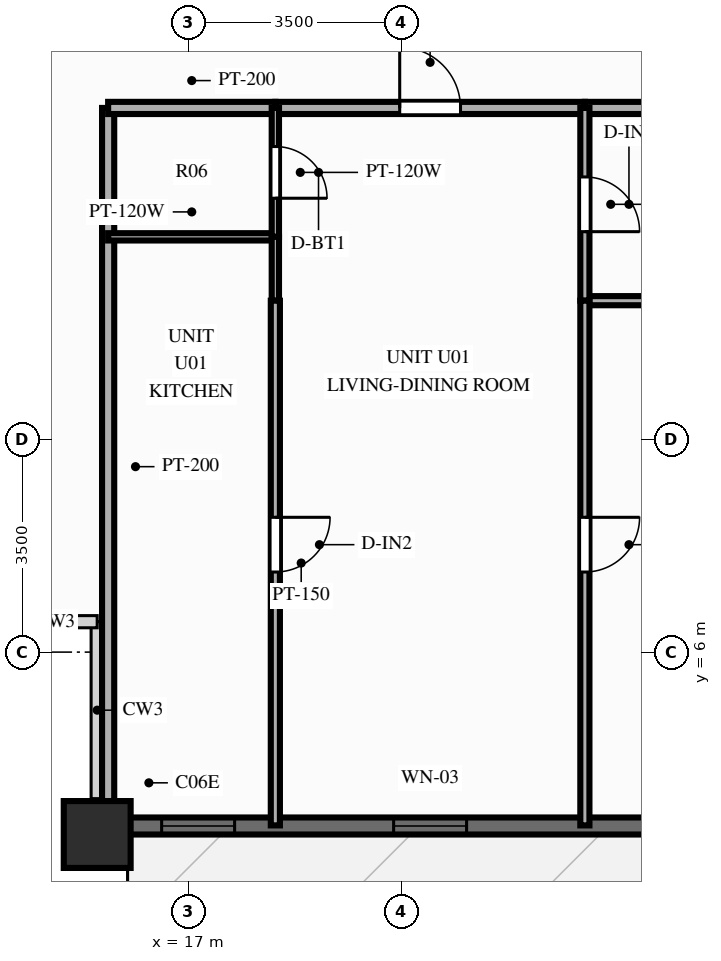
"""IFC4 building model, lengths in metres.
Left out: names, types, materials, properties, quantities, classifications, styles, units other than length and angle.
Written with IfcOpenShell. Run it as: python <this file> out.ifc"""

import sys

from ifc_helpers import new_model, si_unit, direction, frame, frame_2d, origin, origin_2d, place, context, subcontext, project, spatial, rectangle, extrude, source, transform, mapped, element, fill, save


model = new_model("IFC4")
c1 = context("Model", 3, precision=1e-05, world=origin(), true_north=direction((0.0, 1.0)))
c2 = subcontext(c1, "Body", "Model", "MODEL_VIEW")
j1 = project(units=[si_unit("LENGTHUNIT", "METRE"), si_unit("PLANEANGLEUNIT", "RADIAN")], contexts=[c1])
p1 = place(None, origin())
s1 = spatial("IfcSite", under=j1, at=p1, CompositionType="ELEMENT")
p2 = place(p1, origin())
s2 = spatial("IfcBuilding", under=s1, at=p2, CompositionType="ELEMENT")
p3 = place(p2, frame((0.0, 0.0, 34.4)))
s3 = spatial("IfcBuildingStorey", under=s2, at=p3, CompositionType="ELEMENT", Elevation=34.4)
m1 = source(origin(), c2, "Body", "SweptSolid", [
    extrude(rectangle(XDim=1.1, YDim=1.1, at=origin_2d()), origin(), (0.0, 0.0, 1.0), 3.0),
])
p4 = place(p3, frame((15.5, 3.0, 0.0), z_axis=(0.0, 0.0, 1.0), x_axis=(1.0, 0.0, 0.0)))
e1 = element("IfcColumn", 1, at=p4, inside=s3, PredefinedType="COLUMN", context=c2, shape_type="MappedRepresentation", body=[
    mapped(m1, transform((0.0, 0.0, 0.0), scale=1.0)),
])
p5 = place(p3, frame((15.5, 3.14, 0.0), z_axis=(0.0, 0.0, 1.0), x_axis=(1.0, 0.0, 0.0)))
e2 = element("IfcWall", 2, at=p5, inside=s3, PredefinedType="SOLIDWALL", context=c2, shape_type="SweptSolid", body=[
    extrude(rectangle(XDim=45.0, YDim=0.28, at=frame_2d((22.5, 0.0))), origin(), (0.0, 0.0, 1.0), 2.28),
])
p6 = place(p5, frame((1.06, 0.0, 0.25)))
e3 = element("IfcOpeningElement", 3, at=p6, cuts=e2, PredefinedType="OPENING", context=c2, shape_type="SweptSolid", body=[
    extrude(rectangle(XDim=1.2, YDim=1.5, at=frame_2d((0.6, 0.75))), frame((0.0, 0.152, 0.0), z_axis=(0.0, -1.0, 0.0), x_axis=(1.0, 0.0, 0.0)), (0.0, 0.0, 1.0), 0.304),
])
p7 = place(p5, frame((4.875, 0.0, 0.25)))
e4 = element("IfcOpeningElement", 4, at=p7, cuts=e2, PredefinedType="OPENING", context=c2, shape_type="SweptSolid", body=[
    extrude(rectangle(XDim=1.2, YDim=1.5, at=frame_2d((0.6, 0.75))), frame((0.0, 0.152, 0.0), z_axis=(0.0, -1.0, 0.0), x_axis=(1.0, 0.0, 0.0)), (0.0, 0.0, 1.0), 0.304),
])
p8 = place(p5, frame((9.303, 0.0, 0.25)))
e5 = element("IfcOpeningElement", 5, at=p8, cuts=e2, PredefinedType="OPENING", context=c2, shape_type="SweptSolid", body=[
    extrude(rectangle(XDim=1.2, YDim=1.5, at=frame_2d((0.6, 0.75))), frame((0.0, 0.152, 0.0), z_axis=(0.0, -1.0, 0.0), x_axis=(1.0, 0.0, 0.0)), (0.0, 0.0, 1.0), 0.304),
])
p9 = place(p5, frame((13.098, 0.0, 0.25)))
e6 = element("IfcOpeningElement", 6, at=p9, cuts=e2, PredefinedType="OPENING", context=c2, shape_type="SweptSolid", body=[
    extrude(rectangle(XDim=1.2, YDim=1.5, at=frame_2d((0.6, 0.75))), frame((0.0, 0.152, 0.0), z_axis=(0.0, -1.0, 0.0), x_axis=(1.0, 0.0, 0.0)), (0.0, 0.0, 1.0), 0.304),
])
p10 = place(p5, frame((17.408, 0.0, 0.25)))
e7 = element("IfcOpeningElement", 7, at=p10, cuts=e2, PredefinedType="OPENING", context=c2, shape_type="SweptSolid", body=[
    extrude(rectangle(XDim=1.2, YDim=1.5, at=frame_2d((0.6, 0.75))), frame((0.0, 0.152, 0.0), z_axis=(0.0, -1.0, 0.0), x_axis=(1.0, 0.0, 0.0)), (0.0, 0.0, 1.0), 0.304),
])
p11 = place(p5, frame((22.06, 0.0, 0.0), z_axis=(0.0, 0.0, 1.0), x_axis=(-1.0, 0.0, 0.0)))
e8 = element("IfcOpeningElement", 8, at=p11, cuts=e2, PredefinedType="OPENING", context=c2, shape_type="SweptSolid", body=[
    extrude(rectangle(XDim=1.1, YDim=2.15, at=frame_2d((0.55, 1.075))), frame((0.0, 0.152, 0.0), z_axis=(0.0, -1.0, 0.0), x_axis=(1.0, 0.0, 0.0)), (0.0, 0.0, 1.0), 0.304),
])
p12 = place(p5, frame((24.168, 0.0, 0.25)))
e9 = element("IfcOpeningElement", 9, at=p12, cuts=e2, PredefinedType="OPENING", context=c2, shape_type="SweptSolid", body=[
    extrude(rectangle(XDim=1.2, YDim=1.5, at=frame_2d((0.6, 0.75))), frame((0.0, 0.152, 0.0), z_axis=(0.0, -1.0, 0.0), x_axis=(1.0, 0.0, 0.0)), (0.0, 0.0, 1.0), 0.304),
])
p13 = place(p5, frame((26.776, 0.0, 0.25)))
e10 = element("IfcOpeningElement", 10, at=p13, cuts=e2, PredefinedType="OPENING", context=c2, shape_type="SweptSolid", body=[
    extrude(rectangle(XDim=1.2, YDim=1.5, at=frame_2d((0.6, 0.75))), frame((0.0, 0.152, 0.0), z_axis=(0.0, -1.0, 0.0), x_axis=(1.0, 0.0, 0.0)), (0.0, 0.0, 1.0), 0.304),
])
p14 = place(p5, frame((31.613, 0.0, 0.25)))
e11 = element("IfcOpeningElement", 11, at=p14, cuts=e2, PredefinedType="OPENING", context=c2, shape_type="SweptSolid", body=[
    extrude(rectangle(XDim=1.2, YDim=1.5, at=frame_2d((0.6, 0.75))), frame((0.0, 0.152, 0.0), z_axis=(0.0, -1.0, 0.0), x_axis=(1.0, 0.0, 0.0)), (0.0, 0.0, 1.0), 0.304),
])
p15 = place(p5, frame((34.881, 0.0, 0.25)))
e12 = element("IfcOpeningElement", 12, at=p15, cuts=e2, PredefinedType="OPENING", context=c2, shape_type="SweptSolid", body=[
    extrude(rectangle(XDim=1.2, YDim=1.5, at=frame_2d((0.6, 0.75))), frame((0.0, 0.152, 0.0), z_axis=(0.0, -1.0, 0.0), x_axis=(1.0, 0.0, 0.0)), (0.0, 0.0, 1.0), 0.304),
])
p16 = place(p5, frame((38.355, 0.0, 0.25)))
e13 = element("IfcOpeningElement", 13, at=p16, cuts=e2, PredefinedType="OPENING", context=c2, shape_type="SweptSolid", body=[
    extrude(rectangle(XDim=1.2, YDim=1.5, at=frame_2d((0.6, 0.75))), frame((0.0, 0.152, 0.0), z_axis=(0.0, -1.0, 0.0), x_axis=(1.0, 0.0, 0.0)), (0.0, 0.0, 1.0), 0.304),
])
p17 = place(p5, frame((42.232, 0.0, 0.25)))
e14 = element("IfcOpeningElement", 14, at=p17, cuts=e2, PredefinedType="OPENING", context=c2, shape_type="SweptSolid", body=[
    extrude(rectangle(XDim=1.2, YDim=1.5, at=frame_2d((0.6, 0.75))), frame((0.0, 0.152, 0.0), z_axis=(0.0, -1.0, 0.0), x_axis=(1.0, 0.0, 0.0)), (0.0, 0.0, 1.0), 0.304),
])
p18 = place(p3, frame((15.68, 14.95, 0.0), z_axis=(0.0, 0.0, 1.0), x_axis=(0.0, -1.0, 0.0)))
e15 = element("IfcWall", 15, at=p18, inside=s3, PredefinedType="PARTITIONING", context=c2, shape_type="SweptSolid", body=[
    extrude(rectangle(XDim=11.8, YDim=0.2, at=frame_2d((5.9, 0.0))), origin(), (0.0, 0.0, 1.0), 2.79),
])
p19 = place(p3, frame((15.68, 14.95, 0.0), z_axis=(0.0, 0.0, 1.0), x_axis=(1.0, 0.0, 0.0)))
e16 = element("IfcWall", 16, at=p19, inside=s3, PredefinedType="PARTITIONING", context=c2, shape_type="SweptSolid", body=[
    extrude(rectangle(XDim=2.75, YDim=0.2, at=frame_2d((1.375, 0.0))), origin(), (0.0, 0.0, 1.0), 2.79),
])
p20 = place(p3, frame((18.43, 14.95, 0.0), z_axis=(0.0, 0.0, 1.0), x_axis=(1.0, 0.0, 0.0)))
e17 = element("IfcWall", 17, at=p20, inside=s3, PredefinedType="PARTITIONING", context=c2, shape_type="SweptSolid", body=[
    extrude(rectangle(XDim=5.091, YDim=0.2, at=frame_2d((2.545, 0.0))), origin(), (0.0, 0.0, 1.0), 2.79),
])
p21 = place(p20, frame((2.045, 0.0, 0.0)))
e18 = element("IfcOpeningElement", 18, at=p21, cuts=e17, PredefinedType="OPENING", context=c2, shape_type="SweptSolid", body=[
    extrude(rectangle(XDim=1.0, YDim=2.15, at=frame_2d((0.5, 1.075))), frame((0.0, 0.112, 0.0), z_axis=(0.0, -1.0, 0.0), x_axis=(1.0, 0.0, 0.0)), (0.0, 0.0, 1.0), 0.224),
])
p22 = place(p3, frame((23.521, 14.95, 0.0), z_axis=(0.0, 0.0, 1.0), x_axis=(1.0, 0.0, 0.0)))
e19 = element("IfcWall", 19, at=p22, inside=s3, PredefinedType="PARTITIONING", context=c2, shape_type="SweptSolid", body=[
    extrude(rectangle(XDim=3.766, YDim=0.2, at=frame_2d((1.883, 0.0))), origin(), (0.0, 0.0, 1.0), 2.79),
])
p23 = place(p3, frame((15.68, 12.83, 0.0), z_axis=(0.0, 0.0, 1.0), x_axis=(1.0, 0.0, 0.0)))
e20 = element("IfcWall", 20, at=p23, inside=s3, PredefinedType="PARTITIONING", context=c2, shape_type="SweptSolid", body=[
    extrude(rectangle(XDim=2.75, YDim=0.12, at=frame_2d((1.375, 0.0))), origin(), (0.0, 0.0, 1.0), 2.79),
])
p24 = place(p3, frame((23.521, 11.78, 0.0), z_axis=(0.0, 0.0, 1.0), x_axis=(1.0, 0.0, 0.0)))
e21 = element("IfcWall", 21, at=p24, inside=s3, PredefinedType="PARTITIONING", context=c2, shape_type="SweptSolid", body=[
    extrude(rectangle(XDim=3.766, YDim=0.15, at=frame_2d((1.883, 0.0))), origin(), (0.0, 0.0, 1.0), 2.79),
])
p25 = place(p3, frame((18.43, 14.95, 0.0), z_axis=(0.0, 0.0, 1.0), x_axis=(0.0, -1.0, 0.0)))
e22 = element("IfcWall", 22, at=p25, inside=s3, PredefinedType="PARTITIONING", context=c2, shape_type="SweptSolid", body=[
    extrude(rectangle(XDim=2.12, YDim=0.12, at=frame_2d((1.06, 0.0))), origin(), (0.0, 0.0, 1.0), 2.79),
])
p26 = place(p25, frame((0.635, 0.0, 0.0)))
e23 = element("IfcOpeningElement", 23, at=p26, cuts=e22, PredefinedType="OPENING", context=c2, shape_type="SweptSolid", body=[
    extrude(rectangle(XDim=0.85, YDim=2.05, at=frame_2d((0.425, 1.025))), frame((0.0, 0.072, 0.0), z_axis=(0.0, -1.0, 0.0), x_axis=(1.0, 0.0, 0.0)), (0.0, 0.0, 1.0), 0.144),
])
p27 = place(p3, frame((18.43, 12.83, 0.0), z_axis=(0.0, 0.0, 1.0), x_axis=(0.0, -1.0, 0.0)))
e24 = element("IfcWall", 24, at=p27, inside=s3, PredefinedType="PARTITIONING", context=c2, shape_type="SweptSolid", body=[
    extrude(rectangle(XDim=1.05, YDim=0.12, at=frame_2d((0.525, 0.0))), origin(), (0.0, 0.0, 1.0), 2.79),
])
p28 = place(p3, frame((18.43, 11.78, 0.0), z_axis=(0.0, 0.0, 1.0), x_axis=(0.0, -1.0, 0.0)))
e25 = element("IfcWall", 25, at=p28, inside=s3, PredefinedType="PARTITIONING", context=c2, shape_type="SweptSolid", body=[
    extrude(rectangle(XDim=8.63, YDim=0.15, at=frame_2d((4.315, 0.0))), origin(), (0.0, 0.0, 1.0), 2.79),
])
p29 = place(p28, frame((3.563, 0.0, 0.0)))
e26 = element("IfcOpeningElement", 26, at=p29, cuts=e25, PredefinedType="OPENING", context=c2, shape_type="SweptSolid", body=[
    extrude(rectangle(XDim=0.9, YDim=2.1, at=frame_2d((0.45, 1.05))), frame((0.0, 0.087, 0.0), z_axis=(0.0, -1.0, 0.0), x_axis=(1.0, 0.0, 0.0)), (0.0, 0.0, 1.0), 0.174),
])
p30 = place(p3, frame((23.521, 14.95, 0.0), z_axis=(0.0, 0.0, 1.0), x_axis=(0.0, -1.0, 0.0)))
e27 = element("IfcWall", 27, at=p30, inside=s3, PredefinedType="PARTITIONING", context=c2, shape_type="SweptSolid", body=[
    extrude(rectangle(XDim=3.17, YDim=0.15, at=frame_2d((1.585, 0.0))), origin(), (0.0, 0.0, 1.0), 2.79),
])
p31 = place(p30, frame((1.135, 0.0, 0.0)))
e28 = element("IfcOpeningElement", 28, at=p31, cuts=e27, PredefinedType="OPENING", context=c2, shape_type="SweptSolid", body=[
    extrude(rectangle(XDim=0.9, YDim=2.1, at=frame_2d((0.45, 1.05))), frame((0.0, 0.087, 0.0), z_axis=(0.0, -1.0, 0.0), x_axis=(1.0, 0.0, 0.0)), (0.0, 0.0, 1.0), 0.174),
])
p32 = place(p3, frame((23.521, 11.78, 0.0), z_axis=(0.0, 0.0, 1.0), x_axis=(0.0, -1.0, 0.0)))
e29 = element("IfcWall", 29, at=p32, inside=s3, PredefinedType="PARTITIONING", context=c2, shape_type="SweptSolid", body=[
    extrude(rectangle(XDim=8.63, YDim=0.15, at=frame_2d((4.315, 0.0))), origin(), (0.0, 0.0, 1.0), 2.79),
])
p33 = place(p32, frame((3.563, 0.0, 0.0)))
e30 = element("IfcOpeningElement", 30, at=p33, cuts=e29, PredefinedType="OPENING", context=c2, shape_type="SweptSolid", body=[
    extrude(rectangle(XDim=0.9, YDim=2.1, at=frame_2d((0.45, 1.05))), frame((0.0, 0.087, 0.0), z_axis=(0.0, -1.0, 0.0), x_axis=(1.0, 0.0, 0.0)), (0.0, 0.0, 1.0), 0.174),
])
m2 = source(origin(), c2, "Body", "SweptSolid", [
    extrude(rectangle(XDim=1.2, YDim=1.5, at=frame_2d((0.6, 0.75))), frame((0.0, 0.03, 0.0), z_axis=(0.0, -1.0, 0.0), x_axis=(1.0, 0.0, 0.0)), (0.0, 0.0, 1.0), 0.06),
])
p34 = place(p6, origin())
e31 = element("IfcWindow", 31, at=p34, inside=s3, PartitioningType="SINGLE_PANEL", PredefinedType="WINDOW", context=c2, shape_type="MappedRepresentation", body=[
    mapped(m2, transform((0.0, 0.0, 0.0), scale=1.0)),
])
fill(e3, e31)
p35 = place(p7, origin())
e32 = element("IfcWindow", 32, at=p35, inside=s3, PartitioningType="SINGLE_PANEL", PredefinedType="WINDOW", context=c2, shape_type="MappedRepresentation", body=[
    mapped(m2, transform((0.0, 0.0, 0.0), scale=1.0)),
])
fill(e4, e32)
m3 = source(origin(), c2, "Body", "SweptSolid", [
    extrude(rectangle(XDim=1.0, YDim=2.15, at=frame_2d((0.5, 1.075))), frame((0.0, 0.025, 0.0), z_axis=(0.0, -1.0, 0.0), x_axis=(1.0, 0.0, 0.0)), (0.0, 0.0, 1.0), 0.05),
])
p36 = place(p21, origin())
e33 = element("IfcDoor", 33, at=p36, inside=s3, OperationType="SINGLE_SWING_LEFT", PredefinedType="DOOR", context=c2, shape_type="MappedRepresentation", body=[
    mapped(m3, transform((0.0, 0.0, 0.0), scale=1.0)),
])
fill(e18, e33)
m4 = source(origin(), c2, "Body", "SweptSolid", [
    extrude(rectangle(XDim=0.85, YDim=2.05, at=frame_2d((0.425, 1.025))), frame((0.0, 0.025, 0.0), z_axis=(0.0, -1.0, 0.0), x_axis=(1.0, 0.0, 0.0)), (0.0, 0.0, 1.0), 0.05),
])
p37 = place(p26, origin())
e34 = element("IfcDoor", 34, at=p37, inside=s3, OperationType="SINGLE_SWING_RIGHT", PredefinedType="DOOR", context=c2, shape_type="MappedRepresentation", body=[
    mapped(m4, transform((0.0, 0.0, 0.0), scale=1.0)),
])
fill(e23, e34)
m5 = source(origin(), c2, "Body", "SweptSolid", [
    extrude(rectangle(XDim=0.9, YDim=2.1, at=frame_2d((0.45, 1.05))), frame((0.0, 0.025, 0.0), z_axis=(0.0, -1.0, 0.0), x_axis=(1.0, 0.0, 0.0)), (0.0, 0.0, 1.0), 0.05),
])
p38 = place(p29, origin())
e35 = element("IfcDoor", 35, at=p38, inside=s3, OperationType="SINGLE_SWING_LEFT", PredefinedType="DOOR", context=c2, shape_type="MappedRepresentation", body=[
    mapped(m5, transform((0.0, 0.0, 0.0), scale=1.0)),
])
fill(e26, e35)
p39 = place(p31, origin())
e36 = element("IfcDoor", 36, at=p39, inside=s3, OperationType="SINGLE_SWING_RIGHT", PredefinedType="DOOR", context=c2, shape_type="MappedRepresentation", body=[
    mapped(m5, transform((0.0, 0.0, 0.0), scale=1.0)),
])
fill(e28, e36)
p40 = place(p33, origin())
e37 = element("IfcDoor", 37, at=p40, inside=s3, OperationType="SINGLE_SWING_LEFT", PredefinedType="DOOR", context=c2, shape_type="MappedRepresentation", body=[
    mapped(m5, transform((0.0, 0.0, 0.0), scale=1.0)),
])
fill(e30, e37)
save(model, sys.argv[1])
